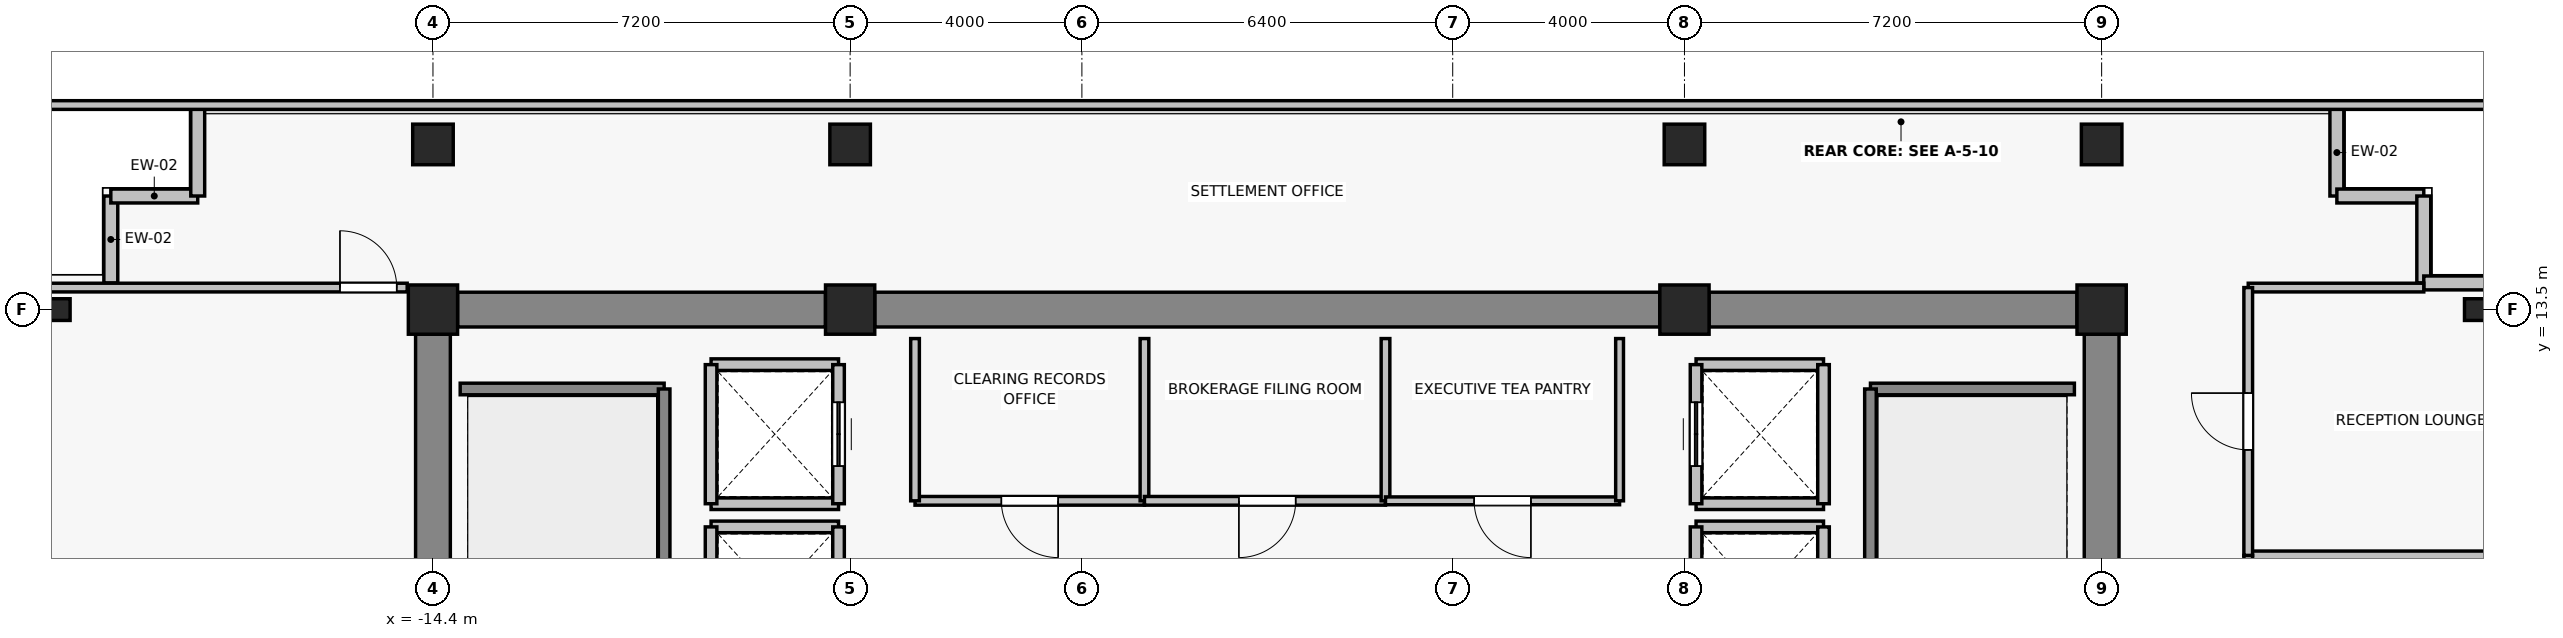
"""IFC4 building model, lengths in metres.
Left out: names, types, materials, properties, quantities, classifications, styles, units other than length and angle.
Written with IfcOpenShell. Run it as: python <this file> out.ifc"""

import sys

from ifc_helpers import new_model, si_unit, direction, frame, frame_2d, origin, origin_2d, place, context, subcontext, project, spatial, rectangle, i_section, extrude, source, transform, mapped, element, fill, save


model = new_model("IFC4")
c1 = context("Model", 3, precision=1e-05, world=origin(), true_north=direction((0.0, 1.0)))
c2 = subcontext(c1, "Body", "Model", "MODEL_VIEW")
j1 = project(units=[si_unit("LENGTHUNIT", "METRE"), si_unit("PLANEANGLEUNIT", "RADIAN")], contexts=[c1])
p1 = place(None, origin())
s1 = spatial("IfcSite", under=j1, at=p1, CompositionType="ELEMENT")
p2 = place(p1, origin())
s2 = spatial("IfcBuilding", under=s1, at=p2, CompositionType="ELEMENT")
p3 = place(p2, frame((0.0, 0.0, 258.4)))
s3 = spatial("IfcBuildingStorey", under=s2, at=p3, CompositionType="ELEMENT", Elevation=258.4)
for number, where, z_axis, x_axis in (
    (1, (-14.4, 13.5, 0.0), (0.0, 0.0, 1.0), (1.0, 0.0, 0.0)),
    (2, (-7.2, 13.5, 0.0), (0.0, 0.0, 1.0), (1.0, 0.0, 0.0)),
    (3, (7.2, 13.5, 0.0), (0.0, 0.0, 1.0), (1.0, 0.0, 0.0)),
    (4, (14.4, 13.5, 0.0), (0.0, 0.0, 1.0), (1.0, 0.0, 0.0)),
):
    element("IfcColumn", number, at=place(p3, frame(where, z_axis=z_axis, x_axis=x_axis)), inside=s3, PredefinedType="COLUMN", context=c2, shape_type="SweptSolid", body=[
        extrude(rectangle(XDim=0.85, YDim=0.85, at=origin_2d()), origin(), (0.0, 0.0, 1.0), 3.3),
    ])
for number, where, z_axis, x_axis in (
    (5, (-14.4, 16.35, 0.0), (0.0, 0.0, 1.0), (1.0, 0.0, 0.0)),
    (6, (-7.2, 16.35, 0.0), (0.0, 0.0, 1.0), (1.0, 0.0, 0.0)),
    (7, (7.2, 16.35, 0.0), (0.0, 0.0, 1.0), (1.0, 0.0, 0.0)),
    (8, (14.4, 16.35, 0.0), (0.0, 0.0, 1.0), (1.0, 0.0, 0.0)),
):
    element("IfcColumn", number, at=place(p3, frame(where, z_axis=z_axis, x_axis=x_axis)), inside=s3, PredefinedType="COLUMN", context=c2, shape_type="SweptSolid", body=[
        extrude(rectangle(XDim=0.7, YDim=0.7, at=origin_2d()), origin(), (0.0, 0.0, 1.0), 3.3),
    ])
for number, where, z_axis, x_axis in (
    (9, (-20.85, 13.5, 0.0), (0.0, 0.0, 1.0), (1.0, 0.0, 0.0)),
    (10, (20.85, 13.5, 0.0), (0.0, 0.0, 1.0), (1.0, 0.0, 0.0)),
):
    element("IfcColumn", number, at=place(p3, frame(where, z_axis=z_axis, x_axis=x_axis)), inside=s3, PredefinedType="COLUMN", context=c2, shape_type="SweptSolid", body=[
        extrude(i_section(OverallWidth=0.375, OverallDepth=0.375, WebThickness=0.017, FlangeThickness=0.027, FilletRadius=0.015, at=origin_2d()), origin(), (0.0, 0.0, 1.0), 3.3),
    ])
p4 = place(p3, frame((-13.975, 13.5, 0.0), z_axis=(0.0, 0.0, 1.0), x_axis=(1.0, 0.0, 0.0)))
e11 = element("IfcWall", 11, at=p4, inside=s3, PredefinedType="SHEAR", context=c2, shape_type="SweptSolid", body=[
    extrude(rectangle(XDim=6.35, YDim=0.6, at=frame_2d((3.175, 0.0))), origin(), (0.0, 0.0, 1.0), 3.075),
])
p5 = place(p3, frame((-6.775, 13.5, 0.0), z_axis=(0.0, 0.0, 1.0), x_axis=(1.0, 0.0, 0.0)))
e12 = element("IfcWall", 12, at=p5, inside=s3, PredefinedType="SHEAR", context=c2, shape_type="SweptSolid", body=[
    extrude(rectangle(XDim=13.55, YDim=0.6, at=frame_2d((6.775, 0.0))), origin(), (0.0, 0.0, 1.0), 3.075),
])
p6 = place(p3, frame((7.625, 13.5, 0.0), z_axis=(0.0, 0.0, 1.0), x_axis=(1.0, 0.0, 0.0)))
e13 = element("IfcWall", 13, at=p6, inside=s3, PredefinedType="SHEAR", context=c2, shape_type="SweptSolid", body=[
    extrude(rectangle(XDim=6.35, YDim=0.6, at=frame_2d((3.175, 0.0))), origin(), (0.0, 0.0, 1.0), 3.075),
])
for number, where, z_axis, x_axis in (
    (14, (-14.4, 7.025, 0.0), (0.0, 0.0, 1.0), (0.0, 1.0, 0.0)),
    (15, (14.4, 7.025, 0.0), (0.0, 0.0, 1.0), (0.0, 1.0, 0.0)),
):
    element("IfcWall", number, at=place(p3, frame(where, z_axis=z_axis, x_axis=x_axis)), inside=s3, PredefinedType="SHEAR", context=c2, shape_type="SweptSolid", body=[
        extrude(rectangle(XDim=6.05, YDim=0.6, at=frame_2d((3.025, 0.0))), origin(), (0.0, 0.0, 1.0), 3.075),
    ])
for number, where, z_axis, x_axis in (
    (16, (-19.96, 15.46, 0.0), (0.0, 0.0, 1.0), (0.0, -1.0, 0.0)),
    (17, (-18.46, 15.46, 0.0), (0.0, 0.0, 1.0), (-1.0, 0.0, 0.0)),
    (18, (-18.46, 16.96, 0.0), (0.0, 0.0, 1.0), (0.0, -1.0, 0.0)),
    (19, (18.46, 15.46, 0.0), (0.0, 0.0, 1.0), (0.0, 1.0, 0.0)),
    (20, (19.96, 15.46, 0.0), (0.0, 0.0, 1.0), (-1.0, 0.0, 0.0)),
    (21, (19.96, 13.96, 0.0), (0.0, 0.0, 1.0), (0.0, 1.0, 0.0)),
    (22, (21.46, 13.96, 0.0), (0.0, 0.0, 1.0), (-1.0, 0.0, 0.0)),
):
    element("IfcWall", number, at=place(p3, frame(where, z_axis=z_axis, x_axis=x_axis)), inside=s3, PredefinedType="SOLIDWALL", context=c2, shape_type="SweptSolid", body=[
        extrude(rectangle(XDim=1.5, YDim=0.24, at=frame_2d((0.75, 0.0))), origin(), (0.0, 0.0, 1.0), 3.075),
    ])
p7 = place(p3, frame((-9.6, 9.75, 0.0), z_axis=(0.0, 0.0, 1.0), x_axis=(1.0, 0.0, 0.0)))
e23 = element("IfcWall", 23, at=p7, inside=s3, PredefinedType="SOLIDWALL", context=c2, shape_type="SweptSolid", body=[
    extrude(rectangle(XDim=2.2, YDim=0.2, at=frame_2d((1.1, 0.0))), origin(), (0.0, 0.0, 1.0), 2.615),
])
p8 = place(p3, frame((-9.6, 7.35, 0.0), z_axis=(0.0, 0.0, 1.0), x_axis=(0.0, 1.0, 0.0)))
e24 = element("IfcWall", 24, at=p8, inside=s3, PredefinedType="SOLIDWALL", context=c2, shape_type="SweptSolid", body=[
    extrude(rectangle(XDim=2.4, YDim=0.2, at=frame_2d((1.2, 0.0))), origin(), (0.0, 0.0, 1.0), 3.075),
])
p9 = place(p3, frame((-7.4, 9.75, 0.0), z_axis=(0.0, 0.0, 1.0), x_axis=(0.0, -1.0, 0.0)))
e25 = element("IfcWall", 25, at=p9, inside=s3, PredefinedType="SOLIDWALL", context=c2, shape_type="SweptSolid", body=[
    extrude(rectangle(XDim=2.4, YDim=0.2, at=frame_2d((1.2, 0.0))), origin(), (0.0, 0.0, 1.0), 2.615),
])
p10 = place(p9, frame((0.65, 0.0, 0.0)))
e26 = element("IfcOpeningElement", 26, at=p10, cuts=e25, PredefinedType="OPENING", context=c2, shape_type="SweptSolid", body=[
    extrude(rectangle(XDim=1.1, YDim=2.2, at=frame_2d((0.55, 1.1))), frame((0.0, 0.11, 0.0), z_axis=(0.0, -1.0, 0.0), x_axis=(1.0, 0.0, 0.0)), (0.0, 0.0, 1.0), 0.22),
])
for number, where, z_axis, x_axis in (
    (27, (-7.4, 10.15, 0.0), (0.0, 0.0, 1.0), (-1.0, 0.0, 0.0)),
    (28, (-9.6, 12.55, 0.0), (0.0, 0.0, 1.0), (1.0, 0.0, 0.0)),
):
    element("IfcWall", number, at=place(p3, frame(where, z_axis=z_axis, x_axis=x_axis)), inside=s3, PredefinedType="SOLIDWALL", context=c2, shape_type="SweptSolid", body=[
        extrude(rectangle(XDim=2.2, YDim=0.2, at=frame_2d((1.1, 0.0))), origin(), (0.0, 0.0, 1.0), 2.615),
    ])
p11 = place(p3, frame((-9.6, 10.15, 0.0), z_axis=(0.0, 0.0, 1.0), x_axis=(0.0, 1.0, 0.0)))
e29 = element("IfcWall", 29, at=p11, inside=s3, PredefinedType="SOLIDWALL", context=c2, shape_type="SweptSolid", body=[
    extrude(rectangle(XDim=2.4, YDim=0.2, at=frame_2d((1.2, 0.0))), origin(), (0.0, 0.0, 1.0), 3.075),
])
p12 = place(p3, frame((-7.4, 12.55, 0.0), z_axis=(0.0, 0.0, 1.0), x_axis=(0.0, -1.0, 0.0)))
e30 = element("IfcWall", 30, at=p12, inside=s3, PredefinedType="SOLIDWALL", context=c2, shape_type="SweptSolid", body=[
    extrude(rectangle(XDim=2.4, YDim=0.2, at=frame_2d((1.2, 0.0))), origin(), (0.0, 0.0, 1.0), 2.615),
])
p13 = place(p12, frame((0.65, 0.0, 0.0)))
e31 = element("IfcOpeningElement", 31, at=p13, cuts=e30, PredefinedType="OPENING", context=c2, shape_type="SweptSolid", body=[
    extrude(rectangle(XDim=1.1, YDim=2.2, at=frame_2d((0.55, 1.1))), frame((0.0, 0.11, 0.0), z_axis=(0.0, -1.0, 0.0), x_axis=(1.0, 0.0, 0.0)), (0.0, 0.0, 1.0), 0.22),
])
p14 = place(p3, frame((7.4, 9.75, 0.0), z_axis=(0.0, 0.0, 1.0), x_axis=(1.0, 0.0, 0.0)))
e32 = element("IfcWall", 32, at=p14, inside=s3, PredefinedType="SOLIDWALL", context=c2, shape_type="SweptSolid", body=[
    extrude(rectangle(XDim=2.2, YDim=0.2, at=frame_2d((1.1, 0.0))), origin(), (0.0, 0.0, 1.0), 2.615),
])
p15 = place(p3, frame((7.4, 7.35, 0.0), z_axis=(0.0, 0.0, 1.0), x_axis=(0.0, 1.0, 0.0)))
e33 = element("IfcWall", 33, at=p15, inside=s3, PredefinedType="SOLIDWALL", context=c2, shape_type="SweptSolid", body=[
    extrude(rectangle(XDim=2.4, YDim=0.2, at=frame_2d((1.2, 0.0))), origin(), (0.0, 0.0, 1.0), 2.615),
])
p16 = place(p15, frame((0.65, 0.0, 0.0)))
e34 = element("IfcOpeningElement", 34, at=p16, cuts=e33, PredefinedType="OPENING", context=c2, shape_type="SweptSolid", body=[
    extrude(rectangle(XDim=1.1, YDim=2.2, at=frame_2d((0.55, 1.1))), frame((0.0, 0.11, 0.0), z_axis=(0.0, -1.0, 0.0), x_axis=(1.0, 0.0, 0.0)), (0.0, 0.0, 1.0), 0.22),
])
p17 = place(p3, frame((9.6, 9.75, 0.0), z_axis=(0.0, 0.0, 1.0), x_axis=(0.0, -1.0, 0.0)))
e35 = element("IfcWall", 35, at=p17, inside=s3, PredefinedType="SOLIDWALL", context=c2, shape_type="SweptSolid", body=[
    extrude(rectangle(XDim=2.4, YDim=0.2, at=frame_2d((1.2, 0.0))), origin(), (0.0, 0.0, 1.0), 3.075),
])
for number, where, z_axis, x_axis in (
    (36, (9.6, 10.15, 0.0), (0.0, 0.0, 1.0), (-1.0, 0.0, 0.0)),
    (37, (7.4, 12.55, 0.0), (0.0, 0.0, 1.0), (1.0, 0.0, 0.0)),
):
    element("IfcWall", number, at=place(p3, frame(where, z_axis=z_axis, x_axis=x_axis)), inside=s3, PredefinedType="SOLIDWALL", context=c2, shape_type="SweptSolid", body=[
        extrude(rectangle(XDim=2.2, YDim=0.2, at=frame_2d((1.1, 0.0))), origin(), (0.0, 0.0, 1.0), 2.615),
    ])
p18 = place(p3, frame((7.4, 10.15, 0.0), z_axis=(0.0, 0.0, 1.0), x_axis=(0.0, 1.0, 0.0)))
e38 = element("IfcWall", 38, at=p18, inside=s3, PredefinedType="SOLIDWALL", context=c2, shape_type="SweptSolid", body=[
    extrude(rectangle(XDim=2.4, YDim=0.2, at=frame_2d((1.2, 0.0))), origin(), (0.0, 0.0, 1.0), 2.615),
])
p19 = place(p18, frame((0.65, 0.0, 0.0)))
e39 = element("IfcOpeningElement", 39, at=p19, cuts=e38, PredefinedType="OPENING", context=c2, shape_type="SweptSolid", body=[
    extrude(rectangle(XDim=1.1, YDim=2.2, at=frame_2d((0.55, 1.1))), frame((0.0, 0.11, 0.0), z_axis=(0.0, -1.0, 0.0), x_axis=(1.0, 0.0, 0.0)), (0.0, 0.0, 1.0), 0.22),
])
p20 = place(p3, frame((9.6, 12.55, 0.0), z_axis=(0.0, 0.0, 1.0), x_axis=(0.0, -1.0, 0.0)))
e40 = element("IfcWall", 40, at=p20, inside=s3, PredefinedType="SOLIDWALL", context=c2, shape_type="SweptSolid", body=[
    extrude(rectangle(XDim=2.4, YDim=0.2, at=frame_2d((1.2, 0.0))), origin(), (0.0, 0.0, 1.0), 3.075),
])
p21 = place(p3, frame((-13.93, 12.13, 0.0), z_axis=(0.0, 0.0, 1.0), x_axis=(1.0, 0.0, 0.0)))
e41 = element("IfcWall", 41, at=p21, inside=s3, PredefinedType="SOLIDWALL", context=c2, shape_type="SweptSolid", body=[
    extrude(rectangle(XDim=3.52, YDim=0.2, at=frame_2d((1.76, 0.0))), origin(), (0.0, 0.0, 1.0), 3.075),
])
p22 = place(p3, frame((-10.41, 12.13, 0.0), z_axis=(0.0, 0.0, 1.0), x_axis=(0.0, -1.0, 0.0)))
e42 = element("IfcWall", 42, at=p22, inside=s3, PredefinedType="SOLIDWALL", context=c2, shape_type="SweptSolid", body=[
    extrude(rectangle(XDim=8.84, YDim=0.2, at=frame_2d((4.42, 0.0))), origin(), (0.0, 0.0, 1.0), 3.075),
])
p23 = place(p3, frame((10.41, 12.13, 0.0), z_axis=(0.0, 0.0, 1.0), x_axis=(1.0, 0.0, 0.0)))
e43 = element("IfcWall", 43, at=p23, inside=s3, PredefinedType="SOLIDWALL", context=c2, shape_type="SweptSolid", body=[
    extrude(rectangle(XDim=3.52, YDim=0.2, at=frame_2d((1.76, 0.0))), origin(), (0.0, 0.0, 1.0), 3.075),
])
p24 = place(p3, frame((10.41, 3.29, 0.0), z_axis=(0.0, 0.0, 1.0), x_axis=(0.0, 1.0, 0.0)))
e44 = element("IfcWall", 44, at=p24, inside=s3, PredefinedType="SOLIDWALL", context=c2, shape_type="SweptSolid", body=[
    extrude(rectangle(XDim=8.84, YDim=0.2, at=frame_2d((4.42, 0.0))), origin(), (0.0, 0.0, 1.0), 3.075),
])
p25 = place(p3, frame((-2.12, 10.2, 0.0), z_axis=(0.0, 0.0, 1.0), x_axis=(-1.0, 0.0, 0.0)))
e45 = element("IfcWall", 45, at=p25, inside=s3, PredefinedType="PARTITIONING", context=c2, shape_type="SweptSolid", body=[
    extrude(rectangle(XDim=3.96, YDim=0.15, at=frame_2d((1.98, 0.0))), origin(), (0.0, 0.0, 1.0), 3.075),
])
p26 = place(p25, frame((1.49, 0.0, 0.0)))
e46 = element("IfcOpeningElement", 46, at=p26, cuts=e45, PredefinedType="OPENING", context=c2, shape_type="SweptSolid", body=[
    extrude(rectangle(XDim=0.98, YDim=2.15, at=frame_2d((0.49, 1.075))), frame((0.0, 0.085, 0.0), z_axis=(0.0, -1.0, 0.0), x_axis=(1.0, 0.0, 0.0)), (0.0, 0.0, 1.0), 0.17),
])
for number, where, z_axis, x_axis in (
    (47, (-6.08, 10.2, 0.0), (0.0, 0.0, 1.0), (0.0, 1.0, 0.0)),
    (48, (-2.12, 13.0, 0.0), (0.0, 0.0, 1.0), (0.0, -1.0, 0.0)),
):
    element("IfcWall", number, at=place(p3, frame(where, z_axis=z_axis, x_axis=x_axis)), inside=s3, PredefinedType="PARTITIONING", context=c2, shape_type="SweptSolid", body=[
        extrude(rectangle(XDim=2.8, YDim=0.15, at=frame_2d((1.4, 0.0))), origin(), (0.0, 0.0, 1.0), 3.075),
    ])
p27 = place(p3, frame((2.04, 10.2, 0.0), z_axis=(0.0, 0.0, 1.0), x_axis=(-1.0, 0.0, 0.0)))
e49 = element("IfcWall", 49, at=p27, inside=s3, PredefinedType="PARTITIONING", context=c2, shape_type="SweptSolid", body=[
    extrude(rectangle(XDim=4.16, YDim=0.15, at=frame_2d((2.08, 0.0))), origin(), (0.0, 0.0, 1.0), 3.075),
])
p28 = place(p27, frame((1.55, 0.0, 0.0)))
e50 = element("IfcOpeningElement", 50, at=p28, cuts=e49, PredefinedType="OPENING", context=c2, shape_type="SweptSolid", body=[
    extrude(rectangle(XDim=0.98, YDim=2.15, at=frame_2d((0.49, 1.075))), frame((0.0, 0.085, 0.0), z_axis=(0.0, -1.0, 0.0), x_axis=(1.0, 0.0, 0.0)), (0.0, 0.0, 1.0), 0.17),
])
p29 = place(p3, frame((2.04, 13.0, 0.0), z_axis=(0.0, 0.0, 1.0), x_axis=(0.0, -1.0, 0.0)))
e51 = element("IfcWall", 51, at=p29, inside=s3, PredefinedType="PARTITIONING", context=c2, shape_type="SweptSolid", body=[
    extrude(rectangle(XDim=2.8, YDim=0.15, at=frame_2d((1.4, 0.0))), origin(), (0.0, 0.0, 1.0), 3.075),
])
p30 = place(p3, frame((6.08, 10.2, 0.0), z_axis=(0.0, 0.0, 1.0), x_axis=(-1.0, 0.0, 0.0)))
e52 = element("IfcWall", 52, at=p30, inside=s3, PredefinedType="PARTITIONING", context=c2, shape_type="SweptSolid", body=[
    extrude(rectangle(XDim=4.04, YDim=0.135, at=frame_2d((2.02, 0.0))), origin(), (0.0, 0.0, 1.0), 3.075),
])
p31 = place(p30, frame((1.53, 0.0, 0.0)))
e53 = element("IfcOpeningElement", 53, at=p31, cuts=e52, PredefinedType="OPENING", context=c2, shape_type="SweptSolid", body=[
    extrude(rectangle(XDim=0.98, YDim=2.15, at=frame_2d((0.49, 1.075))), frame((0.0, 0.077, 0.0), z_axis=(0.0, -1.0, 0.0), x_axis=(1.0, 0.0, 0.0)), (0.0, 0.0, 1.0), 0.155),
])
p32 = place(p3, frame((6.08, 13.0, 0.0), z_axis=(0.0, 0.0, 1.0), x_axis=(0.0, -1.0, 0.0)))
e54 = element("IfcWall", 54, at=p32, inside=s3, PredefinedType="PARTITIONING", context=c2, shape_type="SweptSolid", body=[
    extrude(rectangle(XDim=2.8, YDim=0.135, at=frame_2d((1.4, 0.0))), origin(), (0.0, 0.0, 1.0), 3.075),
])
p33 = place(p3, frame((-21.53, 13.88, 0.0), z_axis=(0.0, 0.0, 1.0), x_axis=(1.0, 0.0, 0.0)))
e55 = element("IfcWall", 55, at=p33, inside=s3, PredefinedType="PARTITIONING", context=c2, shape_type="SweptSolid", body=[
    extrude(rectangle(XDim=6.685, YDim=0.15, at=frame_2d((3.343, 0.0))), origin(), (0.0, 0.0, 1.0), 3.075),
])
p34 = place(p33, frame((5.525, 0.0, 0.0)))
e56 = element("IfcOpeningElement", 56, at=p34, cuts=e55, PredefinedType="OPENING", context=c2, shape_type="SweptSolid", body=[
    extrude(rectangle(XDim=0.98, YDim=2.15, at=frame_2d((0.49, 1.075))), frame((0.0, 0.085, 0.0), z_axis=(0.0, -1.0, 0.0), x_axis=(1.0, 0.0, 0.0)), (0.0, 0.0, 1.0), 0.17),
])
p35 = place(p3, frame((16.93, 9.258, 0.0), z_axis=(0.0, 0.0, 1.0), x_axis=(1.0, 0.0, 0.0)))
e57 = element("IfcWall", 57, at=p35, inside=s3, PredefinedType="PARTITIONING", context=c2, shape_type="SweptSolid", body=[
    extrude(rectangle(XDim=4.6, YDim=0.15, at=frame_2d((2.3, 0.0))), origin(), (0.0, 0.0, 1.0), 2.765),
])
p36 = place(p3, frame((16.93, 3.298, 0.0), z_axis=(0.0, 0.0, 1.0), x_axis=(0.0, 1.0, 0.0)))
e58 = element("IfcWall", 58, at=p36, inside=s3, PredefinedType="PARTITIONING", context=c2, shape_type="SweptSolid", body=[
    extrude(rectangle(XDim=5.96, YDim=0.15, at=frame_2d((2.98, 0.0))), origin(), (0.0, 0.0, 1.0), 3.075),
])
p37 = place(p36, frame((2.49, 0.0, 0.0)))
e59 = element("IfcOpeningElement", 59, at=p37, cuts=e58, PredefinedType="OPENING", context=c2, shape_type="SweptSolid", body=[
    extrude(rectangle(XDim=0.98, YDim=2.15, at=frame_2d((0.49, 1.075))), frame((0.0, 0.085, 0.0), z_axis=(0.0, -1.0, 0.0), x_axis=(1.0, 0.0, 0.0)), (0.0, 0.0, 1.0), 0.17),
])
p38 = place(p3, frame((16.93, 13.88, 0.0), z_axis=(0.0, 0.0, 1.0), x_axis=(1.0, 0.0, 0.0)))
e60 = element("IfcWall", 60, at=p38, inside=s3, PredefinedType="PARTITIONING", context=c2, shape_type="SweptSolid", body=[
    extrude(rectangle(XDim=3.03, YDim=0.15, at=frame_2d((1.515, 0.0))), origin(), (0.0, 0.0, 1.0), 3.075),
])
p39 = place(p3, frame((16.93, 9.258, 0.0), z_axis=(0.0, 0.0, 1.0), x_axis=(0.0, 1.0, 0.0)))
e61 = element("IfcWall", 61, at=p39, inside=s3, PredefinedType="PARTITIONING", context=c2, shape_type="SweptSolid", body=[
    extrude(rectangle(XDim=4.622, YDim=0.15, at=frame_2d((2.311, 0.0))), origin(), (0.0, 0.0, 1.0), 2.615),
])
p40 = place(p39, frame((1.821, 0.0, 0.0)))
e62 = element("IfcOpeningElement", 62, at=p40, cuts=e61, PredefinedType="OPENING", context=c2, shape_type="SweptSolid", body=[
    extrude(rectangle(XDim=0.98, YDim=2.15, at=frame_2d((0.49, 1.075))), frame((0.0, 0.085, 0.0), z_axis=(0.0, -1.0, 0.0), x_axis=(1.0, 0.0, 0.0)), (0.0, 0.0, 1.0), 0.17),
])
p41 = place(p3, frame((-21.53, 17.03, 0.0), z_axis=(0.0, 0.0, 1.0), x_axis=(1.0, 0.0, 0.0)))
e63 = element("IfcWall", 63, at=p41, inside=s3, PredefinedType="PARTITIONING", context=c2, shape_type="SweptSolid", body=[
    extrude(rectangle(XDim=43.06, YDim=0.15, at=frame_2d((21.53, 0.0))), origin(), (0.0, 0.0, 1.0), 3.075),
])
m1 = source(origin(), c2, "Body", "SweptSolid", [
    extrude(rectangle(XDim=1.1, YDim=2.2, at=frame_2d((0.55, 1.1))), frame((0.0, 0.025, 0.0), z_axis=(0.0, -1.0, 0.0), x_axis=(1.0, 0.0, 0.0)), (0.0, 0.0, 1.0), 0.05),
])
p42 = place(p13, origin())
e64 = element("IfcDoor", 64, at=p42, inside=s3, OperationType="DOUBLE_DOOR_SLIDING", PredefinedType="DOOR", context=c2, shape_type="MappedRepresentation", body=[
    mapped(m1, transform((0.0, 0.0, 0.0), x_axis=(1.0, 0.0, 0.0), y_axis=(0.0, 1.0, 0.0), z_axis=(0.0, 0.0, 1.0), scale=1.0)),
])
fill(e31, e64)
p43 = place(p19, origin())
e65 = element("IfcDoor", 65, at=p43, inside=s3, OperationType="DOUBLE_DOOR_SLIDING", PredefinedType="DOOR", context=c2, shape_type="MappedRepresentation", body=[
    mapped(m1, transform((0.0, 0.0, 0.0), x_axis=(1.0, 0.0, 0.0), y_axis=(0.0, 1.0, 0.0), z_axis=(0.0, 0.0, 1.0), scale=1.0)),
])
fill(e39, e65)
m2 = source(origin(), c2, "Body", "SweptSolid", [
    extrude(rectangle(XDim=0.98, YDim=2.15, at=frame_2d((0.49, 1.075))), frame((0.0, 0.025, 0.0), z_axis=(0.0, -1.0, 0.0), x_axis=(1.0, 0.0, 0.0)), (0.0, 0.0, 1.0), 0.05),
])
p44 = place(p26, origin())
e66 = element("IfcDoor", 66, at=p44, inside=s3, OperationType="SINGLE_SWING_LEFT", PredefinedType="DOOR", context=c2, shape_type="MappedRepresentation", body=[
    mapped(m2, transform((0.0, 0.0, 0.0), x_axis=(1.0, 0.0, 0.0), y_axis=(0.0, 1.0, 0.0), z_axis=(0.0, 0.0, 1.0), scale=1.0)),
])
fill(e46, e66)
p45 = place(p28, origin())
e67 = element("IfcDoor", 67, at=p45, inside=s3, OperationType="SINGLE_SWING_RIGHT", PredefinedType="DOOR", context=c2, shape_type="MappedRepresentation", body=[
    mapped(m2, transform((0.0, 0.0, 0.0), x_axis=(1.0, 0.0, 0.0), y_axis=(0.0, 1.0, 0.0), z_axis=(0.0, 0.0, 1.0), scale=1.0)),
])
fill(e50, e67)
p46 = place(p31, origin())
e68 = element("IfcDoor", 68, at=p46, inside=s3, OperationType="SINGLE_SWING_LEFT", PredefinedType="DOOR", context=c2, shape_type="MappedRepresentation", body=[
    mapped(m2, transform((0.0, 0.0, 0.0), x_axis=(1.0, 0.0, 0.0), y_axis=(0.0, 1.0, 0.0), z_axis=(0.0, 0.0, 1.0), scale=1.0)),
])
fill(e53, e68)
p47 = place(p40, origin())
e69 = element("IfcDoor", 69, at=p47, inside=s3, OperationType="SINGLE_SWING_RIGHT", PredefinedType="DOOR", context=c2, shape_type="MappedRepresentation", body=[
    mapped(m2, transform((0.0, 0.0, 0.0), x_axis=(1.0, 0.0, 0.0), y_axis=(0.0, 1.0, 0.0), z_axis=(0.0, 0.0, 1.0), scale=1.0)),
])
fill(e62, e69)
p48 = place(p34, origin())
e70 = element("IfcDoor", 70, at=p48, inside=s3, OperationType="SINGLE_SWING_LEFT", PredefinedType="DOOR", context=c2, shape_type="MappedRepresentation", body=[
    mapped(m2, transform((0.0, 0.0, 0.0), x_axis=(1.0, 0.0, 0.0), y_axis=(0.0, 1.0, 0.0), z_axis=(0.0, 0.0, 1.0), scale=1.0)),
])
fill(e56, e70)
save(model, sys.argv[1])
